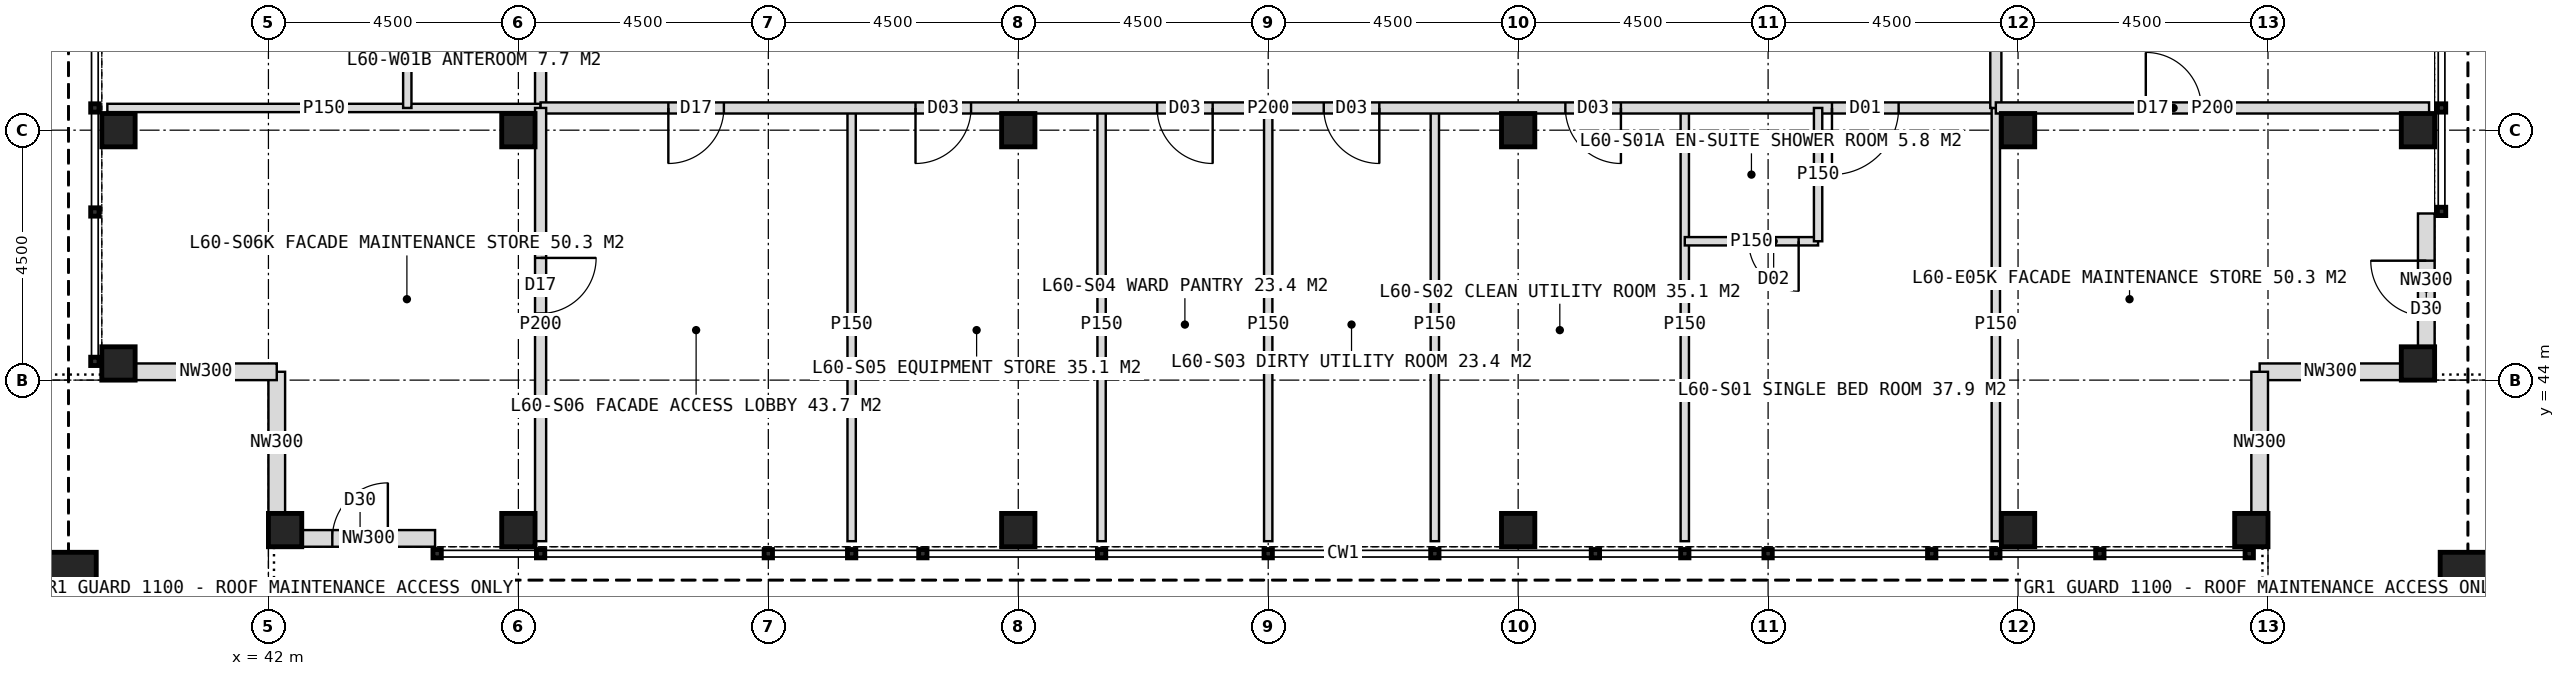
"""IFC4 building model, lengths in metres.
Left out: names, types, materials, properties, quantities, classifications, styles, units other than length and angle.
Written with IfcOpenShell. Run it as: python <this file> out.ifc"""

import sys

from ifc_helpers import new_model, si_unit, direction, frame, frame_2d, origin, origin_2d, place, context, subcontext, project, spatial, rectangle, hollow_rectangle, extrude, element, fill, save


model = new_model("IFC4")
c1 = context("Model", 3, precision=1e-05, world=origin(), true_north=direction((0.0, 1.0)))
c2 = subcontext(c1, "Body", "Model", "MODEL_VIEW")
j1 = project(units=[si_unit("LENGTHUNIT", "METRE"), si_unit("PLANEANGLEUNIT", "RADIAN")], contexts=[c1])
p1 = place(None, origin())
s1 = spatial("IfcSite", under=j1, at=p1, CompositionType="ELEMENT")
p2 = place(p1, origin())
s2 = spatial("IfcBuilding", under=s1, at=p2, CompositionType="ELEMENT")
p3 = place(p2, frame((0.0, 0.0, 250.0)))
s3 = spatial("IfcBuildingStorey", under=s2, at=p3, CompositionType="ELEMENT", Elevation=250.0)
for number, where, z_axis, x_axis in (
    (1, (46.5, 48.5, 0.0), (0.0, 0.0, 1.0), (1.0, 0.0, 0.0)),
    (2, (73.5, 48.5, 0.0), (0.0, 0.0, 1.0), (1.0, 0.0, 0.0)),
    (3, (55.5, 48.5, 0.0), (0.0, 0.0, 1.0), (1.0, 0.0, 0.0)),
    (4, (64.5, 48.5, 0.0), (0.0, 0.0, 1.0), (1.0, 0.0, 0.0)),
    (5, (42.3, 41.3, 0.0), (0.0, 0.0, 1.0), (1.0, 0.0, 0.0)),
    (6, (39.3, 44.3, 0.0), (0.0, 0.0, 1.0), (1.0, 0.0, 0.0)),
    (7, (80.7, 44.3, 0.0), (0.0, 0.0, 1.0), (1.0, 0.0, 0.0)),
    (8, (46.5, 41.3, 0.0), (0.0, 0.0, 1.0), (1.0, 0.0, 0.0)),
    (9, (39.3, 48.5, 0.0), (0.0, 0.0, 1.0), (1.0, 0.0, 0.0)),
    (10, (80.7, 48.5, 0.0), (0.0, 0.0, 1.0), (1.0, 0.0, 0.0)),
    (11, (55.5, 41.3, 0.0), (0.0, 0.0, 1.0), (1.0, 0.0, 0.0)),
    (12, (64.5, 41.3, 0.0), (0.0, 0.0, 1.0), (1.0, 0.0, 0.0)),
    (13, (73.5, 41.3, 0.0), (0.0, 0.0, 1.0), (1.0, 0.0, 0.0)),
    (14, (77.7, 41.3, 0.0), (0.0, 0.0, 1.0), (1.0, 0.0, 0.0)),
):
    element("IfcColumn", number, at=place(p3, frame(where, z_axis=z_axis, x_axis=x_axis)), inside=s3, PredefinedType="COLUMN", context=c2, shape_type="SweptSolid", body=[
        extrude(hollow_rectangle(XDim=0.6, YDim=0.6, WallThickness=0.04, at=origin_2d()), origin(), (0.0, 0.0, 1.0), 4.0),
    ])
for number, where, z_axis, x_axis in (
    (15, (38.4, 40.4, 2.0), (0.0, 0.0, 1.0), (1.0, 0.0, 0.0)),
    (16, (81.6, 40.4, 2.0), (0.0, 0.0, 1.0), (1.0, 0.0, 0.0)),
):
    element("IfcColumn", number, at=place(p3, frame(where, z_axis=z_axis, x_axis=x_axis)), inside=s3, PredefinedType="COLUMN", context=c2, shape_type="SweptSolid", body=[
        extrude(hollow_rectangle(XDim=1.0, YDim=1.0, WallThickness=0.06, at=origin_2d()), origin(), (0.0, 0.0, 1.0), 2.0),
    ])
p4 = place(p3, frame((45.0, 41.15, 0.0), z_axis=(0.0, 0.0, 1.0), x_axis=(-1.0, 0.0, 0.0)))
e17 = element("IfcWall", 17, at=p4, inside=s3, PredefinedType="ELEMENTEDWALL", context=c2, shape_type="SweptSolid", body=[
    extrude(rectangle(XDim=2.4, YDim=0.3, at=frame_2d((1.2, 0.0))), origin(), (0.0, 0.0, 1.0), 3.226),
])
p5 = place(p4, frame((0.85, 0.0, 0.0)))
e18 = element("IfcOpeningElement", 18, at=p5, cuts=e17, PredefinedType="OPENING", context=c2, shape_type="SweptSolid", body=[
    extrude(rectangle(XDim=1.0, YDim=2.1, at=frame_2d((0.5, 1.05))), frame((0.0, 0.16, 0.0), z_axis=(0.0, -1.0, 0.0), x_axis=(1.0, 0.0, 0.0)), (0.0, 0.0, 1.0), 0.32),
])
p6 = place(p3, frame((80.85, 47.0, 0.0), z_axis=(0.0, 0.0, 1.0), x_axis=(0.0, -1.0, 0.0)))
e19 = element("IfcWall", 19, at=p6, inside=s3, PredefinedType="ELEMENTEDWALL", context=c2, shape_type="SweptSolid", body=[
    extrude(rectangle(XDim=2.4, YDim=0.3, at=frame_2d((1.2, 0.0))), origin(), (0.0, 0.0, 1.0), 3.226),
])
p7 = place(p6, frame((0.85, 0.0, 0.0)))
e20 = element("IfcOpeningElement", 20, at=p7, cuts=e19, PredefinedType="OPENING", context=c2, shape_type="SweptSolid", body=[
    extrude(rectangle(XDim=1.0, YDim=2.1, at=frame_2d((0.5, 1.05))), frame((0.0, 0.16, 0.0), z_axis=(0.0, -1.0, 0.0), x_axis=(1.0, 0.0, 0.0)), (0.0, 0.0, 1.0), 0.32),
])
for number, where, z_axis, x_axis in (
    (21, (42.15, 41.6, 0.0), (0.0, 0.0, 1.0), (0.0, 1.0, 0.0)),
    (22, (42.15, 44.15, 0.0), (0.0, 0.0, 1.0), (-1.0, 0.0, 0.0)),
    (23, (80.4, 44.15, 0.0), (0.0, 0.0, 1.0), (-1.0, 0.0, 0.0)),
    (24, (77.85, 44.15, 0.0), (0.0, 0.0, 1.0), (0.0, -1.0, 0.0)),
):
    element("IfcWall", number, at=place(p3, frame(where, z_axis=z_axis, x_axis=x_axis)), inside=s3, PredefinedType="ELEMENTEDWALL", context=c2, shape_type="SweptSolid", body=[
        extrude(rectangle(XDim=2.55, YDim=0.3, at=frame_2d((1.275, 0.0))), origin(), (0.0, 0.0, 1.0), 2.95),
    ])
p8 = place(p3, frame((46.9, 48.9, 0.0), z_axis=(0.0, 0.0, 1.0), x_axis=(0.0, 1.0, 0.0)))
e25 = element("IfcWall", 25, at=p8, inside=s3, PredefinedType="PARTITIONING", context=c2, shape_type="SweptSolid", body=[
    extrude(rectangle(XDim=26.2, YDim=0.2, at=frame_2d((13.1, 0.0))), origin(), (0.0, 0.0, 1.0), 3.75),
])
p9 = place(p8, frame((1.75, 0.0, 0.0)))
e26 = element("IfcOpeningElement", 26, at=p9, cuts=e25, PredefinedType="OPENING", context=c2, shape_type="SweptSolid", body=[
    extrude(rectangle(XDim=1.2, YDim=2.2, at=frame_2d((0.6, 1.1))), frame((0.0, 0.11, 0.0), z_axis=(0.0, -1.0, 0.0), x_axis=(1.0, 0.0, 0.0)), (0.0, 0.0, 1.0), 0.22),
])
p10 = place(p8, frame((6.75, 0.0, 0.0)))
e27 = element("IfcOpeningElement", 27, at=p10, cuts=e25, PredefinedType="OPENING", context=c2, shape_type="SweptSolid", body=[
    extrude(rectangle(XDim=1.0, YDim=2.1, at=frame_2d((0.5, 1.05))), frame((0.0, 0.11, 0.0), z_axis=(0.0, -1.0, 0.0), x_axis=(1.0, 0.0, 0.0)), (0.0, 0.0, 1.0), 0.22),
])
p11 = place(p8, frame((11.1, 0.0, 0.0)))
e28 = element("IfcOpeningElement", 28, at=p11, cuts=e25, PredefinedType="OPENING", context=c2, shape_type="SweptSolid", body=[
    extrude(rectangle(XDim=1.0, YDim=2.1, at=frame_2d((0.5, 1.05))), frame((0.0, 0.11, 0.0), z_axis=(0.0, -1.0, 0.0), x_axis=(1.0, 0.0, 0.0)), (0.0, 0.0, 1.0), 0.22),
])
p12 = place(p8, frame((18.45, 0.0, 0.0)))
e29 = element("IfcOpeningElement", 29, at=p12, cuts=e25, PredefinedType="OPENING", context=c2, shape_type="SweptSolid", body=[
    extrude(rectangle(XDim=1.2, YDim=2.2, at=frame_2d((0.6, 1.1))), frame((0.0, 0.11, 0.0), z_axis=(0.0, -1.0, 0.0), x_axis=(1.0, 0.0, 0.0)), (0.0, 0.0, 1.0), 0.22),
])
p13 = place(p8, frame((22.9, 0.0, 0.0)))
e30 = element("IfcOpeningElement", 30, at=p13, cuts=e25, PredefinedType="OPENING", context=c2, shape_type="SweptSolid", body=[
    extrude(rectangle(XDim=1.0, YDim=2.1, at=frame_2d((0.5, 1.05))), frame((0.0, 0.11, 0.0), z_axis=(0.0, -1.0, 0.0), x_axis=(1.0, 0.0, 0.0)), (0.0, 0.0, 1.0), 0.22),
])
p14 = place(p3, frame((46.9, 48.9, 0.0), z_axis=(0.0, 0.0, 1.0), x_axis=(-1.0, 0.0, 0.0)))
e31 = element("IfcWall", 31, at=p14, inside=s3, PredefinedType="PARTITIONING", context=c2, shape_type="SweptSolid", body=[
    extrude(rectangle(XDim=7.8, YDim=0.15, at=frame_2d((3.9, 0.0))), origin(), (0.0, 0.0, 1.0), 3.75),
])
p15 = place(p3, frame((44.5, 48.9, 0.0), z_axis=(0.0, 0.0, 1.0), x_axis=(0.0, 1.0, 0.0)))
e32 = element("IfcWall", 32, at=p15, inside=s3, PredefinedType="PARTITIONING", context=c2, shape_type="SweptSolid", body=[
    extrude(rectangle(XDim=3.2, YDim=0.15, at=frame_2d((1.6, 0.0))), origin(), (0.0, 0.0, 1.0), 3.75),
])
p16 = place(p15, frame((1.75, 0.0, 0.0)))
e33 = element("IfcOpeningElement", 33, at=p16, cuts=e32, PredefinedType="OPENING", context=c2, shape_type="SweptSolid", body=[
    extrude(rectangle(XDim=1.2, YDim=2.2, at=frame_2d((0.6, 1.1))), frame((0.0, 0.085, 0.0), z_axis=(0.0, -1.0, 0.0), x_axis=(1.0, 0.0, 0.0)), (0.0, 0.0, 1.0), 0.17),
])
for number, where, z_axis, x_axis in (
    (34, (67.5, 48.9, 0.0), (0.0, 0.0, 1.0), (0.0, -1.0, 0.0)),
    (35, (63.0, 48.9, 0.0), (0.0, 0.0, 1.0), (0.0, -1.0, 0.0)),
):
    element("IfcWall", number, at=place(p3, frame(where, z_axis=z_axis, x_axis=x_axis)), inside=s3, PredefinedType="PARTITIONING", context=c2, shape_type="SweptSolid", body=[
        extrude(rectangle(XDim=7.8, YDim=0.15, at=frame_2d((3.9, 0.0))), origin(), (0.0, 0.0, 1.0), 3.75),
    ])
p17 = place(p3, frame((60.0, 48.9, 0.0), z_axis=(0.0, 0.0, 1.0), x_axis=(0.0, -1.0, 0.0)))
e36 = element("IfcWall", 36, at=p17, inside=s3, PredefinedType="PARTITIONING", context=c2, shape_type="SweptSolid", body=[
    extrude(rectangle(XDim=7.8, YDim=0.15, at=frame_2d((3.9, 0.0))), origin(), (0.0, 0.0, 1.0), 2.75),
])
for number, where, z_axis, x_axis in (
    (37, (57.0, 48.9, 0.0), (0.0, 0.0, 1.0), (0.0, -1.0, 0.0)),
    (38, (52.5, 48.9, 0.0), (0.0, 0.0, 1.0), (0.0, -1.0, 0.0)),
):
    element("IfcWall", number, at=place(p3, frame(where, z_axis=z_axis, x_axis=x_axis)), inside=s3, PredefinedType="PARTITIONING", context=c2, shape_type="SweptSolid", body=[
        extrude(rectangle(XDim=7.8, YDim=0.15, at=frame_2d((3.9, 0.0))), origin(), (0.0, 0.0, 1.0), 3.75),
    ])
p18 = place(p3, frame((73.1, 48.9, 0.0), z_axis=(0.0, 0.0, 1.0), x_axis=(-1.0, 0.0, 0.0)))
e39 = element("IfcWall", 39, at=p18, inside=s3, PredefinedType="PARTITIONING", context=c2, shape_type="SweptSolid", body=[
    extrude(rectangle(XDim=26.2, YDim=0.2, at=frame_2d((13.1, 0.0))), origin(), (0.0, 0.0, 1.0), 3.75),
])
p19 = place(p18, frame((1.75, 0.0, 0.0)))
e40 = element("IfcOpeningElement", 40, at=p19, cuts=e39, PredefinedType="OPENING", context=c2, shape_type="SweptSolid", body=[
    extrude(rectangle(XDim=1.2, YDim=2.2, at=frame_2d((0.6, 1.1))), frame((0.0, 0.11, 0.0), z_axis=(0.0, -1.0, 0.0), x_axis=(1.0, 0.0, 0.0)), (0.0, 0.0, 1.0), 0.22),
])
p20 = place(p18, frame((6.75, 0.0, 0.0)))
e41 = element("IfcOpeningElement", 41, at=p20, cuts=e39, PredefinedType="OPENING", context=c2, shape_type="SweptSolid", body=[
    extrude(rectangle(XDim=1.0, YDim=2.1, at=frame_2d((0.5, 1.05))), frame((0.0, 0.11, 0.0), z_axis=(0.0, -1.0, 0.0), x_axis=(1.0, 0.0, 0.0)), (0.0, 0.0, 1.0), 0.22),
])
p21 = place(p18, frame((11.1, 0.0, 0.0)))
e42 = element("IfcOpeningElement", 42, at=p21, cuts=e39, PredefinedType="OPENING", context=c2, shape_type="SweptSolid", body=[
    extrude(rectangle(XDim=1.0, YDim=2.1, at=frame_2d((0.5, 1.05))), frame((0.0, 0.11, 0.0), z_axis=(0.0, -1.0, 0.0), x_axis=(1.0, 0.0, 0.0)), (0.0, 0.0, 1.0), 0.22),
])
p22 = place(p18, frame((14.1, 0.0, 0.0)))
e43 = element("IfcOpeningElement", 43, at=p22, cuts=e39, PredefinedType="OPENING", context=c2, shape_type="SweptSolid", body=[
    extrude(rectangle(XDim=1.0, YDim=2.1, at=frame_2d((0.5, 1.05))), frame((0.0, 0.11, 0.0), z_axis=(0.0, -1.0, 0.0), x_axis=(1.0, 0.0, 0.0)), (0.0, 0.0, 1.0), 0.22),
])
p23 = place(p18, frame((18.45, 0.0, 0.0)))
e44 = element("IfcOpeningElement", 44, at=p23, cuts=e39, PredefinedType="OPENING", context=c2, shape_type="SweptSolid", body=[
    extrude(rectangle(XDim=1.0, YDim=2.1, at=frame_2d((0.5, 1.05))), frame((0.0, 0.11, 0.0), z_axis=(0.0, -1.0, 0.0), x_axis=(1.0, 0.0, 0.0)), (0.0, 0.0, 1.0), 0.22),
])
p24 = place(p18, frame((22.9, 0.0, 0.0)))
e45 = element("IfcOpeningElement", 45, at=p24, cuts=e39, PredefinedType="OPENING", context=c2, shape_type="SweptSolid", body=[
    extrude(rectangle(XDim=1.0, YDim=2.1, at=frame_2d((0.5, 1.05))), frame((0.0, 0.11, 0.0), z_axis=(0.0, -1.0, 0.0), x_axis=(1.0, 0.0, 0.0)), (0.0, 0.0, 1.0), 0.22),
])
p25 = place(p3, frame((73.1, 48.9, 0.0), z_axis=(0.0, 0.0, 1.0), x_axis=(0.0, -1.0, 0.0)))
e46 = element("IfcWall", 46, at=p25, inside=s3, PredefinedType="PARTITIONING", context=c2, shape_type="SweptSolid", body=[
    extrude(rectangle(XDim=7.8, YDim=0.15, at=frame_2d((3.9, 0.0))), origin(), (0.0, 0.0, 1.0), 3.75),
])
p26 = place(p3, frame((69.9, 46.5, 0.0), z_axis=(0.0, 0.0, 1.0), x_axis=(-1.0, 0.0, 0.0)))
e47 = element("IfcWall", 47, at=p26, inside=s3, PredefinedType="PARTITIONING", context=c2, shape_type="SweptSolid", body=[
    extrude(rectangle(XDim=2.4, YDim=0.15, at=frame_2d((1.2, 0.0))), origin(), (0.0, 0.0, 1.0), 3.75),
])
p27 = place(p26, frame((0.35, 0.0, 0.0)))
e48 = element("IfcOpeningElement", 48, at=p27, cuts=e47, PredefinedType="OPENING", context=c2, shape_type="SweptSolid", body=[
    extrude(rectangle(XDim=0.9, YDim=2.1, at=frame_2d((0.45, 1.05))), frame((0.0, 0.085, 0.0), z_axis=(0.0, -1.0, 0.0), x_axis=(1.0, 0.0, 0.0)), (0.0, 0.0, 1.0), 0.17),
])
p28 = place(p3, frame((69.9, 48.9, 0.0), z_axis=(0.0, 0.0, 1.0), x_axis=(0.0, -1.0, 0.0)))
e49 = element("IfcWall", 49, at=p28, inside=s3, PredefinedType="PARTITIONING", context=c2, shape_type="SweptSolid", body=[
    extrude(rectangle(XDim=2.4, YDim=0.15, at=frame_2d((1.2, 0.0))), origin(), (0.0, 0.0, 1.0), 3.75),
])
p29 = place(p3, frame((46.9, 48.9, 0.0), z_axis=(0.0, 0.0, 1.0), x_axis=(0.0, -1.0, 0.0)))
e50 = element("IfcWall", 50, at=p29, inside=s3, PredefinedType="PARTITIONING", context=c2, shape_type="SweptSolid", body=[
    extrude(rectangle(XDim=7.8, YDim=0.2, at=frame_2d((3.9, 0.0))), origin(), (0.0, 0.0, 1.0), 3.75),
])
p30 = place(p29, frame((2.7, 0.0, 0.0)))
e51 = element("IfcOpeningElement", 51, at=p30, cuts=e50, PredefinedType="OPENING", context=c2, shape_type="SweptSolid", body=[
    extrude(rectangle(XDim=1.0, YDim=2.1, at=frame_2d((0.5, 1.05))), frame((0.0, 0.11, 0.0), z_axis=(0.0, -1.0, 0.0), x_axis=(1.0, 0.0, 0.0)), (0.0, 0.0, 1.0), 0.22),
])
p31 = place(p3, frame((73.1, 71.0, 0.0), z_axis=(0.0, 0.0, 1.0), x_axis=(0.0, -1.0, 0.0)))
e52 = element("IfcWall", 52, at=p31, inside=s3, PredefinedType="PARTITIONING", context=c2, shape_type="SweptSolid", body=[
    extrude(rectangle(XDim=22.1, YDim=0.2, at=frame_2d((11.05, 0.0))), origin(), (0.0, 0.0, 1.0), 3.75),
])
p32 = place(p31, frame((2.65, 0.0, 0.0)))
e53 = element("IfcOpeningElement", 53, at=p32, cuts=e52, PredefinedType="OPENING", context=c2, shape_type="SweptSolid", body=[
    extrude(rectangle(XDim=1.0, YDim=2.1, at=frame_2d((0.5, 1.05))), frame((0.0, 0.11, 0.0), z_axis=(0.0, -1.0, 0.0), x_axis=(1.0, 0.0, 0.0)), (0.0, 0.0, 1.0), 0.22),
])
p33 = place(p31, frame((7.0, 0.0, 0.0)))
e54 = element("IfcOpeningElement", 54, at=p33, cuts=e52, PredefinedType="OPENING", context=c2, shape_type="SweptSolid", body=[
    extrude(rectangle(XDim=1.0, YDim=2.1, at=frame_2d((0.5, 1.05))), frame((0.0, 0.11, 0.0), z_axis=(0.0, -1.0, 0.0), x_axis=(1.0, 0.0, 0.0)), (0.0, 0.0, 1.0), 0.22),
])
p34 = place(p31, frame((14.35, 0.0, 0.0)))
e55 = element("IfcOpeningElement", 55, at=p34, cuts=e52, PredefinedType="OPENING", context=c2, shape_type="SweptSolid", body=[
    extrude(rectangle(XDim=1.2, YDim=2.2, at=frame_2d((0.6, 1.1))), frame((0.0, 0.11, 0.0), z_axis=(0.0, -1.0, 0.0), x_axis=(1.0, 0.0, 0.0)), (0.0, 0.0, 1.0), 0.22),
])
p35 = place(p31, frame((18.8, 0.0, 0.0)))
e56 = element("IfcOpeningElement", 56, at=p35, cuts=e52, PredefinedType="OPENING", context=c2, shape_type="SweptSolid", body=[
    extrude(rectangle(XDim=1.0, YDim=2.1, at=frame_2d((0.5, 1.05))), frame((0.0, 0.11, 0.0), z_axis=(0.0, -1.0, 0.0), x_axis=(1.0, 0.0, 0.0)), (0.0, 0.0, 1.0), 0.22),
])
p36 = place(p3, frame((73.1, 48.9, 0.0), z_axis=(0.0, 0.0, 1.0), x_axis=(1.0, 0.0, 0.0)))
e57 = element("IfcWall", 57, at=p36, inside=s3, PredefinedType="PARTITIONING", context=c2, shape_type="SweptSolid", body=[
    extrude(rectangle(XDim=7.8, YDim=0.2, at=frame_2d((3.9, 0.0))), origin(), (0.0, 0.0, 1.0), 3.75),
])
p37 = place(p36, frame((2.7, 0.0, 0.0)))
e58 = element("IfcOpeningElement", 58, at=p37, cuts=e57, PredefinedType="OPENING", context=c2, shape_type="SweptSolid", body=[
    extrude(rectangle(XDim=1.0, YDim=2.1, at=frame_2d((0.5, 1.05))), frame((0.0, 0.11, 0.0), z_axis=(0.0, -1.0, 0.0), x_axis=(1.0, 0.0, 0.0)), (0.0, 0.0, 1.0), 0.22),
])
p38 = place(p19, origin())
e59 = element("IfcDoor", 59, at=p38, inside=s3, OperationType="SINGLE_SWING_RIGHT", PredefinedType="DOOR", context=c2, shape_type="SweptSolid", body=[
    extrude(rectangle(XDim=1.2, YDim=2.2, at=frame_2d((0.6, 1.1))), frame((0.0, 0.025, 0.0), z_axis=(0.0, -1.0, 0.0), x_axis=(1.0, 0.0, 0.0)), (0.0, 0.0, 1.0), 0.05),
])
fill(e40, e59)
p39 = place(p27, origin())
e60 = element("IfcDoor", 60, at=p39, inside=s3, OperationType="SINGLE_SWING_LEFT", PredefinedType="DOOR", context=c2, shape_type="SweptSolid", body=[
    extrude(rectangle(XDim=0.9, YDim=2.1, at=frame_2d((0.45, 1.05))), frame((0.0, 0.025, 0.0), z_axis=(0.0, -1.0, 0.0), x_axis=(1.0, 0.0, 0.0)), (0.0, 0.0, 1.0), 0.05),
])
fill(e48, e60)
p40 = place(p20, origin())
e61 = element("IfcDoor", 61, at=p40, inside=s3, OperationType="SINGLE_SWING_LEFT", PredefinedType="DOOR", context=c2, shape_type="SweptSolid", body=[
    extrude(rectangle(XDim=1.0, YDim=2.1, at=frame_2d((0.5, 1.05))), frame((0.0, 0.025, 0.0), z_axis=(0.0, -1.0, 0.0), x_axis=(1.0, 0.0, 0.0)), (0.0, 0.0, 1.0), 0.05),
])
fill(e41, e61)
p41 = place(p21, origin())
e62 = element("IfcDoor", 62, at=p41, inside=s3, OperationType="SINGLE_SWING_LEFT", PredefinedType="DOOR", context=c2, shape_type="SweptSolid", body=[
    extrude(rectangle(XDim=1.0, YDim=2.1, at=frame_2d((0.5, 1.05))), frame((0.0, 0.025, 0.0), z_axis=(0.0, -1.0, 0.0), x_axis=(1.0, 0.0, 0.0)), (0.0, 0.0, 1.0), 0.05),
])
fill(e42, e62)
p42 = place(p22, origin())
e63 = element("IfcDoor", 63, at=p42, inside=s3, OperationType="SINGLE_SWING_LEFT", PredefinedType="DOOR", context=c2, shape_type="SweptSolid", body=[
    extrude(rectangle(XDim=1.0, YDim=2.1, at=frame_2d((0.5, 1.05))), frame((0.0, 0.025, 0.0), z_axis=(0.0, -1.0, 0.0), x_axis=(1.0, 0.0, 0.0)), (0.0, 0.0, 1.0), 0.05),
])
fill(e43, e63)
p43 = place(p23, origin())
e64 = element("IfcDoor", 64, at=p43, inside=s3, OperationType="SINGLE_SWING_RIGHT", PredefinedType="DOOR", context=c2, shape_type="SweptSolid", body=[
    extrude(rectangle(XDim=1.0, YDim=2.1, at=frame_2d((0.5, 1.05))), frame((0.0, 0.025, 0.0), z_axis=(0.0, -1.0, 0.0), x_axis=(1.0, 0.0, 0.0)), (0.0, 0.0, 1.0), 0.05),
])
fill(e44, e64)
p44 = place(p30, origin())
e65 = element("IfcDoor", 65, at=p44, inside=s3, OperationType="SINGLE_SWING_LEFT", PredefinedType="DOOR", context=c2, shape_type="SweptSolid", body=[
    extrude(rectangle(XDim=1.0, YDim=2.1, at=frame_2d((0.5, 1.05))), frame((0.0, 0.025, 0.0), z_axis=(0.0, -1.0, 0.0), x_axis=(1.0, 0.0, 0.0)), (0.0, 0.0, 1.0), 0.05),
])
fill(e51, e65)
p45 = place(p24, origin())
e66 = element("IfcDoor", 66, at=p45, inside=s3, OperationType="SINGLE_SWING_RIGHT", PredefinedType="DOOR", context=c2, shape_type="SweptSolid", body=[
    extrude(rectangle(XDim=1.0, YDim=2.1, at=frame_2d((0.5, 1.05))), frame((0.0, 0.025, 0.0), z_axis=(0.0, -1.0, 0.0), x_axis=(1.0, 0.0, 0.0)), (0.0, 0.0, 1.0), 0.05),
])
fill(e45, e66)
p46 = place(p37, origin())
e67 = element("IfcDoor", 67, at=p46, inside=s3, OperationType="SINGLE_SWING_LEFT", PredefinedType="DOOR", context=c2, shape_type="SweptSolid", body=[
    extrude(rectangle(XDim=1.0, YDim=2.1, at=frame_2d((0.5, 1.05))), frame((0.0, 0.025, 0.0), z_axis=(0.0, -1.0, 0.0), x_axis=(1.0, 0.0, 0.0)), (0.0, 0.0, 1.0), 0.05),
])
fill(e58, e67)
p47 = place(p7, frame((1.0, 0.0, 0.0), z_axis=(0.0, 0.0, 1.0), x_axis=(-1.0, 0.0, 0.0)))
e68 = element("IfcDoor", 68, at=p47, inside=s3, OperationType="SINGLE_SWING_RIGHT", PredefinedType="DOOR", context=c2, shape_type="SweptSolid", body=[
    extrude(rectangle(XDim=1.0, YDim=2.1, at=frame_2d((0.5, 1.05))), frame((0.0, 0.025, 0.0), z_axis=(0.0, -1.0, 0.0), x_axis=(1.0, 0.0, 0.0)), (0.0, 0.0, 1.0), 0.05),
])
fill(e20, e68)
p48 = place(p5, frame((1.0, 0.0, 0.0), z_axis=(0.0, 0.0, 1.0), x_axis=(-1.0, 0.0, 0.0)))
e69 = element("IfcDoor", 69, at=p48, inside=s3, OperationType="SINGLE_SWING_RIGHT", PredefinedType="DOOR", context=c2, shape_type="SweptSolid", body=[
    extrude(rectangle(XDim=1.0, YDim=2.1, at=frame_2d((0.5, 1.05))), frame((0.0, 0.025, 0.0), z_axis=(0.0, -1.0, 0.0), x_axis=(1.0, 0.0, 0.0)), (0.0, 0.0, 1.0), 0.05),
])
fill(e18, e69)
save(model, sys.argv[1])
